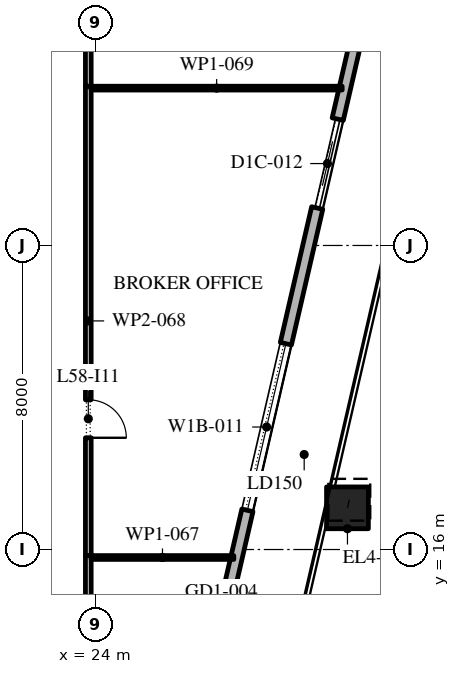
"""IFC4 building model, lengths in metres.
Left out: names, types, materials, properties, quantities, classifications, styles, units other than length and angle.
Written with IfcOpenShell. Run it as: python <this file> out.ifc"""

import sys

from ifc_helpers import new_model, si_unit, direction, frame, frame_2d, origin, origin_2d, place, context, subcontext, project, spatial, rectangle, extrude, element, fill, save


model = new_model("IFC4")
c1 = context("Model", 3, precision=1e-05, world=origin(), true_north=direction((0.0, 1.0)))
c2 = subcontext(c1, "Body", "Model", "MODEL_VIEW")
j1 = project(units=[si_unit("LENGTHUNIT", "METRE"), si_unit("PLANEANGLEUNIT", "RADIAN")], contexts=[c1])
p1 = place(None, origin())
s1 = spatial("IfcSite", under=j1, at=p1, CompositionType="ELEMENT")
p2 = place(p1, origin())
s2 = spatial("IfcBuilding", under=s1, at=p2, CompositionType="ELEMENT")
p3 = place(p2, frame((0.0, 0.0, 268.2)))
s3 = spatial("IfcBuildingStorey", under=s2, at=p3, CompositionType="ELEMENT", Elevation=268.2)
p4 = place(p3, frame((30.619, 17.097, 0.0), z_axis=(0.011668267153, 0.050562490995, 0.998652735462), x_axis=(-0.974391195695, 0.224859506699, 0.0)))
e1 = element("IfcColumn", 1, at=p4, inside=s3, PredefinedType="COLUMN", context=c2, shape_type="SweptSolid", body=[
    extrude(rectangle(XDim=1.1, YDim=1.1, at=origin_2d()), origin(), (0.0, 0.0, 1.0), 4.206),
])
p5 = place(p3, frame((21.359, -11.678, 0.0), z_axis=(0.0, 0.0, 1.0), x_axis=(0.224949198343, 0.974370493275, 0.0)))
e2 = element("IfcWall", 2, at=p5, inside=s3, PredefinedType="STANDARD", context=c2, shape_type="SweptSolid", body=[
    extrude(rectangle(XDim=49.5, YDim=0.3, at=frame_2d((24.75, 0.0))), origin(), (0.0, 0.0, 1.0), 4.0),
])
p6 = place(p5, frame((1.157, 0.0, 0.45)))
e3 = element("IfcOpeningElement", 3, at=p6, cuts=e2, PredefinedType="OPENING", context=c2, shape_type="SweptSolid", body=[
    extrude(rectangle(XDim=4.5, YDim=3.05, at=frame_2d((2.25, 1.525))), frame((0.0, 0.16, 0.0), z_axis=(0.0, -1.0, 0.0), x_axis=(1.0, 0.0, 0.0)), (0.0, 0.0, 1.0), 0.32),
])
p7 = place(p5, frame((8.121, 0.0, 0.45)))
e4 = element("IfcOpeningElement", 4, at=p7, cuts=e2, PredefinedType="OPENING", context=c2, shape_type="SweptSolid", body=[
    extrude(rectangle(XDim=4.5, YDim=3.05, at=frame_2d((2.25, 1.525))), frame((0.0, 0.16, 0.0), z_axis=(0.0, -1.0, 0.0), x_axis=(1.0, 0.0, 0.0)), (0.0, 0.0, 1.0), 0.32),
])
p8 = place(p5, frame((15.236, 0.0, 0.45)))
e5 = element("IfcOpeningElement", 5, at=p8, cuts=e2, PredefinedType="OPENING", context=c2, shape_type="SweptSolid", body=[
    extrude(rectangle(XDim=4.5, YDim=3.05, at=frame_2d((2.25, 1.525))), frame((0.0, 0.16, 0.0), z_axis=(0.0, -1.0, 0.0), x_axis=(1.0, 0.0, 0.0)), (0.0, 0.0, 1.0), 0.32),
])
p9 = place(p5, frame((22.35, 0.0, 0.45)))
e6 = element("IfcOpeningElement", 6, at=p9, cuts=e2, PredefinedType="OPENING", context=c2, shape_type="SweptSolid", body=[
    extrude(rectangle(XDim=4.5, YDim=3.05, at=frame_2d((2.25, 1.525))), frame((0.0, 0.16, 0.0), z_axis=(0.0, -1.0, 0.0), x_axis=(1.0, 0.0, 0.0)), (0.0, 0.0, 1.0), 0.32),
])
p10 = place(p5, frame((29.464, 0.0, 0.45)))
e7 = element("IfcOpeningElement", 7, at=p10, cuts=e2, PredefinedType="OPENING", context=c2, shape_type="SweptSolid", body=[
    extrude(rectangle(XDim=4.5, YDim=2.95, at=frame_2d((2.25, 1.475))), frame((0.0, 0.16, 0.0), z_axis=(0.0, -1.0, 0.0), x_axis=(1.0, 0.0, 0.0)), (0.0, 0.0, 1.0), 0.32),
])
p11 = place(p5, frame((37.628, 0.0, 0.0)))
e8 = element("IfcOpeningElement", 8, at=p11, cuts=e2, PredefinedType="OPENING", context=c2, shape_type="SweptSolid", body=[
    extrude(rectangle(XDim=2.4, YDim=3.325, at=frame_2d((1.2, 1.663))), frame((0.0, 0.16, 0.0), z_axis=(0.0, -1.0, 0.0), x_axis=(1.0, 0.0, 0.0)), (0.0, 0.0, 1.0), 0.32),
])
p12 = place(p5, frame((43.693, 0.0, 0.45)))
e9 = element("IfcOpeningElement", 9, at=p12, cuts=e2, PredefinedType="OPENING", context=c2, shape_type="SweptSolid", body=[
    extrude(rectangle(XDim=4.5, YDim=3.05, at=frame_2d((2.25, 1.525))), frame((0.0, 0.16, 0.0), z_axis=(0.0, -1.0, 0.0), x_axis=(1.0, 0.0, 0.0)), (0.0, 0.0, 1.0), 0.32),
])
p13 = place(p3, frame((23.8, 15.84, 0.0), z_axis=(0.0, 0.0, 1.0), x_axis=(0.0, -1.0, 0.0)))
e10 = element("IfcWall", 10, at=p13, inside=s3, PredefinedType="PARTITIONING", context=c2, shape_type="SweptSolid", body=[
    extrude(rectangle(XDim=12.905, YDim=0.15, at=frame_2d((6.453, 0.0))), origin(), (0.0, 0.0, 1.0), 4.0),
])
p14 = place(p13, frame((6.08, 0.0, 0.0)))
e11 = element("IfcOpeningElement", 11, at=p14, cuts=e10, PredefinedType="OPENING", context=c2, shape_type="SweptSolid", body=[
    extrude(rectangle(XDim=1.0, YDim=2.1, at=frame_2d((0.5, 1.05))), frame((0.0, 0.085, 0.0), z_axis=(0.0, -1.0, 0.0), x_axis=(1.0, 0.0, 0.0)), (0.0, 0.0, 1.0), 0.17),
])
p15 = place(p3, frame((23.875, 15.79, 0.0), z_axis=(0.0, 0.0, 1.0), x_axis=(1.0, 0.0, 0.0)))
e12 = element("IfcWall", 12, at=p15, inside=s3, PredefinedType="PARTITIONING", context=c2, shape_type="SweptSolid", body=[
    extrude(rectangle(XDim=3.754, YDim=0.1, at=frame_2d((1.877, 0.0))), origin(), (0.0, 0.0, 1.0), 4.0),
])
p16 = place(p3, frame((23.8, 28.19, 0.0), z_axis=(0.0, 0.0, 1.0), x_axis=(0.0, -1.0, 0.0)))
e13 = element("IfcWall", 13, at=p16, inside=s3, PredefinedType="PARTITIONING", context=c2, shape_type="SweptSolid", body=[
    extrude(rectangle(XDim=12.35, YDim=0.15, at=frame_2d((6.175, 0.0))), origin(), (0.0, 0.0, 1.0), 4.0),
])
p17 = place(p16, frame((8.25, 0.0, 0.0)))
e14 = element("IfcOpeningElement", 14, at=p17, cuts=e13, PredefinedType="OPENING", context=c2, shape_type="SweptSolid", body=[
    extrude(rectangle(XDim=1.0, YDim=2.1, at=frame_2d((0.5, 1.05))), frame((0.0, 0.085, 0.0), z_axis=(0.0, -1.0, 0.0), x_axis=(1.0, 0.0, 0.0)), (0.0, 0.0, 1.0), 0.17),
])
p18 = place(p3, frame((23.875, 28.14, 0.0), z_axis=(0.0, 0.0, 1.0), x_axis=(1.0, 0.0, 0.0)))
e15 = element("IfcWall", 15, at=p18, inside=s3, PredefinedType="PARTITIONING", context=c2, shape_type="SweptSolid", body=[
    extrude(rectangle(XDim=6.605, YDim=0.1, at=frame_2d((3.302, 0.0))), origin(), (0.0, 0.0, 1.0), 4.0),
])
p19 = place(p3, frame((23.8, 32.425, 0.0), z_axis=(0.0, 0.0, 1.0), x_axis=(0.0, -1.0, 0.0)))
e16 = element("IfcWall", 16, at=p19, inside=s3, PredefinedType="PARTITIONING", context=c2, shape_type="SweptSolid", body=[
    extrude(rectangle(XDim=4.235, YDim=0.15, at=frame_2d((2.118, 0.0))), origin(), (0.0, 0.0, 1.0), 4.0),
])
p20 = place(p19, frame((1.635, 0.0, 0.0)))
e17 = element("IfcOpeningElement", 17, at=p20, cuts=e16, PredefinedType="OPENING", context=c2, shape_type="SweptSolid", body=[
    extrude(rectangle(XDim=1.0, YDim=2.1, at=frame_2d((0.5, 1.05))), frame((0.0, 0.085, 0.0), z_axis=(0.0, -1.0, 0.0), x_axis=(1.0, 0.0, 0.0)), (0.0, 0.0, 1.0), 0.17),
])
p21 = place(p10, origin())
e18 = element("IfcWindow", 18, at=p21, inside=s3, PartitioningType="DOUBLE_PANEL_VERTICAL", PredefinedType="WINDOW", context=c2, shape_type="SweptSolid", body=[
    extrude(rectangle(XDim=4.5, YDim=2.95, at=frame_2d((2.25, 1.475))), frame((0.0, 0.03, 0.0), z_axis=(0.0, -1.0, 0.0), x_axis=(1.0, 0.0, 0.0)), (0.0, 0.0, 1.0), 0.06),
])
fill(e7, e18)
p22 = place(p11, origin())
e19 = element("IfcDoor", 19, at=p22, inside=s3, OperationType="DOUBLE_DOOR_SLIDING", PredefinedType="DOOR", context=c2, shape_type="SweptSolid", body=[
    extrude(rectangle(XDim=2.4, YDim=3.325, at=frame_2d((1.2, 1.663))), frame((0.0, 0.025, 0.0), z_axis=(0.0, -1.0, 0.0), x_axis=(1.0, 0.0, 0.0)), (0.0, 0.0, 1.0), 0.05),
])
fill(e8, e19)
p23 = place(p17, origin())
e20 = element("IfcDoor", 20, at=p23, inside=s3, OperationType="SINGLE_SWING_LEFT", PredefinedType="DOOR", context=c2, shape_type="SweptSolid", body=[
    extrude(rectangle(XDim=1.0, YDim=2.1, at=frame_2d((0.5, 1.05))), frame((0.0, 0.025, 0.0), z_axis=(0.0, -1.0, 0.0), x_axis=(1.0, 0.0, 0.0)), (0.0, 0.0, 1.0), 0.05),
])
fill(e14, e20)
save(model, sys.argv[1])
